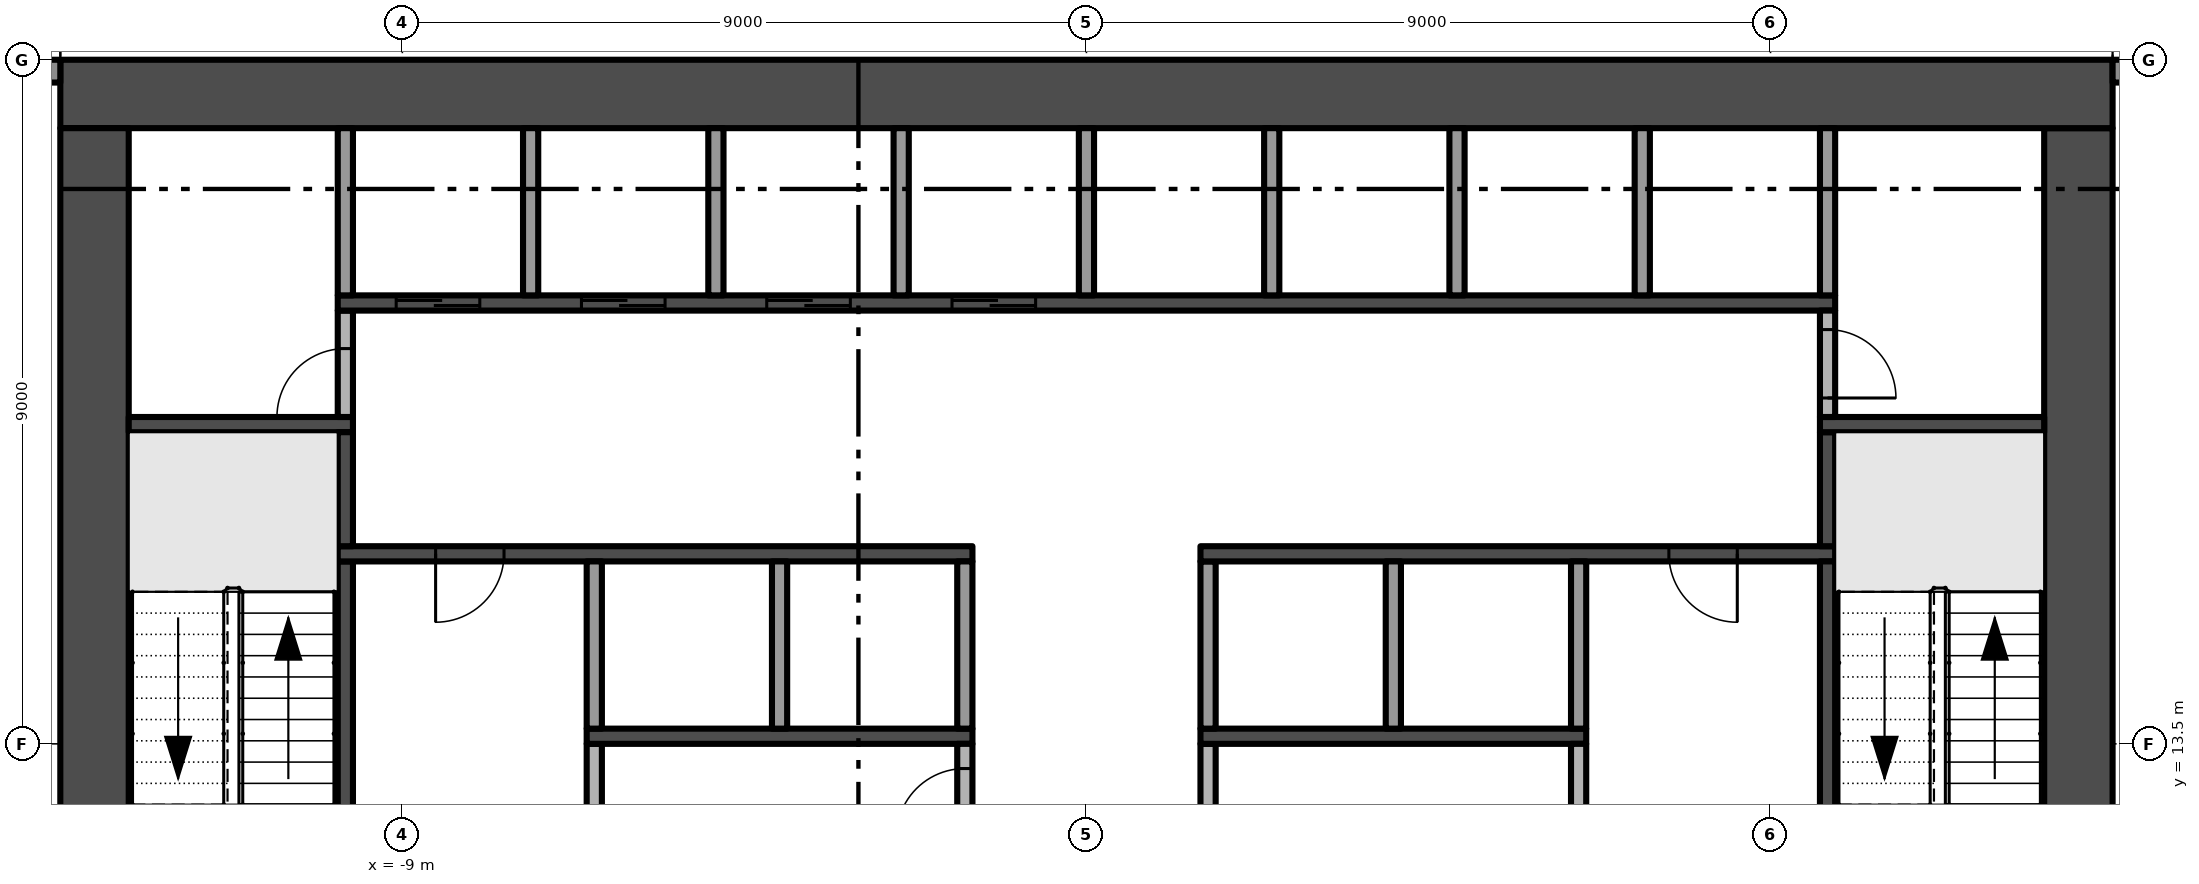
"""IFC4 building model, lengths in metres.
Left out: names, types, materials, properties, quantities, classifications, styles, units other than length and angle.
Written with IfcOpenShell. Run it as: python <this file> out.ifc"""

import sys

from ifc_helpers import new_model, si_unit, direction, frame, frame_2d, origin, place, context, subcontext, project, spatial, rectangle, extrude, element, fill, save


model = new_model("IFC4")
c1 = context("Model", 3, precision=1e-05, world=origin(), true_north=direction((0.0, 1.0)))
c2 = subcontext(c1, "Body", "Model", "MODEL_VIEW")
j1 = project(units=[si_unit("LENGTHUNIT", "METRE"), si_unit("PLANEANGLEUNIT", "RADIAN")], contexts=[c1])
p1 = place(None, origin())
s1 = spatial("IfcSite", under=j1, at=p1, CompositionType="ELEMENT")
p2 = place(p1, origin())
s2 = spatial("IfcBuilding", under=s1, at=p2, CompositionType="ELEMENT")
p3 = place(p2, frame((0.0, 0.0, 49.2)))
s3 = spatial("IfcBuildingStorey", under=s2, at=p3, CompositionType="ELEMENT", Elevation=49.2)
p4 = place(p3, frame((13.05, 5.4, -0.3), z_axis=(0.0, 0.0, 1.0), x_axis=(0.0, 1.0, 0.0)))
e1 = element("IfcWall", 1, at=p4, inside=s3, PredefinedType="SHEAR", context=c2, shape_type="SweptSolid", body=[
    extrude(rectangle(XDim=16.2, YDim=0.9, at=frame_2d((8.1, 0.0))), origin(), (0.0, 0.0, 1.0), 3.8),
])
p5 = place(p4, frame((6.0, 0.0, 0.3)))
e2 = element("IfcOpeningElement", 2, at=p5, cuts=e1, PredefinedType="OPENING", context=c2, shape_type="SweptSolid", body=[
    extrude(rectangle(XDim=1.2, YDim=2.2, at=frame_2d((0.6, 1.1))), frame((0.0, 0.46, 0.0), z_axis=(0.0, -1.0, 0.0), x_axis=(1.0, 0.0, 0.0)), (0.0, 0.0, 1.0), 0.92),
])
p6 = place(p3, frame((13.5, 22.05, -0.3), z_axis=(0.0, 0.0, 1.0), x_axis=(-1.0, 0.0, 0.0)))
e3 = element("IfcWall", 3, at=p6, inside=s3, PredefinedType="SHEAR", context=c2, shape_type="SweptSolid", body=[
    extrude(rectangle(XDim=27.0, YDim=0.9, at=frame_2d((13.5, 0.0))), origin(), (0.0, 0.0, 1.0), 3.8),
])
p7 = place(p3, frame((-13.05, 21.6, -0.3), z_axis=(0.0, 0.0, 1.0), x_axis=(0.0, -1.0, 0.0)))
e4 = element("IfcWall", 4, at=p7, inside=s3, PredefinedType="SHEAR", context=c2, shape_type="SweptSolid", body=[
    extrude(rectangle(XDim=16.2, YDim=0.9, at=frame_2d((8.1, 0.0))), origin(), (0.0, 0.0, 1.0), 3.8),
])
p8 = place(p7, frame((9.0, 0.0, 0.3)))
e5 = element("IfcOpeningElement", 5, at=p8, cuts=e4, PredefinedType="OPENING", context=c2, shape_type="SweptSolid", body=[
    extrude(rectangle(XDim=1.2, YDim=2.2, at=frame_2d((0.6, 1.1))), frame((0.0, 0.46, 0.0), z_axis=(0.0, -1.0, 0.0), x_axis=(1.0, 0.0, 0.0)), (0.0, 0.0, 1.0), 0.92),
])
p9 = place(p3, frame((13.5, 22.35, 0.0), z_axis=(0.0, 0.0, 1.0), x_axis=(1.0, 0.0, 0.0)))
e6 = element("IfcWall", 6, at=p9, inside=s3, PredefinedType="SOLIDWALL", context=c2, shape_type="SweptSolid", body=[
    extrude(rectangle(XDim=3.8, YDim=0.3, at=frame_2d((1.9, 0.0))), origin(), (0.0, 0.0, 1.0), 3.5),
])
p10 = place(p9, frame((0.85, 0.0, 0.45)))
e7 = element("IfcOpeningElement", 7, at=p10, cuts=e6, PredefinedType="OPENING", context=c2, shape_type="SweptSolid", body=[
    extrude(rectangle(XDim=2.65, YDim=2.65, at=frame_2d((1.325, 1.325))), frame((0.0, 0.16, 0.0), z_axis=(0.0, -1.0, 0.0), x_axis=(1.0, 0.0, 0.0)), (0.0, 0.0, 1.0), 0.32),
])
p11 = place(p3, frame((-17.3, 22.35, 0.0), z_axis=(0.0, 0.0, 1.0), x_axis=(1.0, 0.0, 0.0)))
e8 = element("IfcWall", 8, at=p11, inside=s3, PredefinedType="SOLIDWALL", context=c2, shape_type="SweptSolid", body=[
    extrude(rectangle(XDim=3.8, YDim=0.3, at=frame_2d((1.9, 0.0))), origin(), (0.0, 0.0, 1.0), 3.5),
])
p12 = place(p11, frame((0.3, 0.0, 0.0)))
e9 = element("IfcOpeningElement", 9, at=p12, cuts=e8, PredefinedType="OPENING", context=c2, shape_type="SweptSolid", body=[
    extrude(rectangle(XDim=2.65, YDim=2.4, at=frame_2d((1.325, 1.2))), frame((0.0, 0.16, 0.0), z_axis=(0.0, -1.0, 0.0), x_axis=(1.0, 0.0, 0.0)), (0.0, 0.0, 1.0), 0.32),
])
p13 = place(p3, frame((-12.6, 17.7, 0.0), z_axis=(0.0, 0.0, 1.0), x_axis=(1.0, 0.0, 0.0)))
e10 = element("IfcWall", 10, at=p13, inside=s3, PredefinedType="SHEAR", context=c2, shape_type="SweptSolid", body=[
    extrude(rectangle(XDim=2.95, YDim=0.2, at=frame_2d((1.475, 0.0))), origin(), (0.0, 0.0, 1.0), 3.5),
])
p14 = place(p3, frame((-9.75, 10.4, 0.0), z_axis=(0.0, 0.0, 1.0), x_axis=(0.0, 1.0, 0.0)))
e11 = element("IfcWall", 11, at=p14, inside=s3, PredefinedType="SHEAR", context=c2, shape_type="SweptSolid", body=[
    extrude(rectangle(XDim=5.5, YDim=0.2, at=frame_2d((2.75, 0.0))), origin(), (0.0, 0.0, 1.0), 3.5),
])
p15 = place(p3, frame((-1.5, 16.0, 0.0), z_axis=(0.0, 0.0, 1.0), x_axis=(-1.0, 0.0, 0.0)))
e12 = element("IfcWall", 12, at=p15, inside=s3, PredefinedType="SHEAR", context=c2, shape_type="SweptSolid", body=[
    extrude(rectangle(XDim=8.35, YDim=0.2, at=frame_2d((4.175, 0.0))), origin(), (0.0, 0.0, 1.0), 3.5),
])
p16 = place(p15, frame((6.162, 0.0, 0.0)))
e13 = element("IfcOpeningElement", 13, at=p16, cuts=e12, PredefinedType="OPENING", context=c2, shape_type="SweptSolid", body=[
    extrude(rectangle(XDim=0.9, YDim=2.1, at=frame_2d((0.45, 1.05))), frame((0.0, 0.11, 0.0), z_axis=(0.0, -1.0, 0.0), x_axis=(1.0, 0.0, 0.0)), (0.0, 0.0, 1.0), 0.22),
])
p17 = place(p3, frame((-9.75, 16.1, 0.0), z_axis=(0.0, 0.0, 1.0), x_axis=(0.0, 1.0, 0.0)))
e14 = element("IfcWall", 14, at=p17, inside=s3, PredefinedType="SHEAR", context=c2, shape_type="SweptSolid", body=[
    extrude(rectangle(XDim=1.5, YDim=0.2, at=frame_2d((0.75, 0.0))), origin(), (0.0, 0.0, 1.0), 3.5),
])
p18 = place(p3, frame((-9.75, 17.8, 0.0), z_axis=(0.0, 0.0, 1.0), x_axis=(0.0, 1.0, 0.0)))
e15 = element("IfcWall", 15, at=p18, inside=s3, PredefinedType="PARTITIONING", context=c2, shape_type="SweptSolid", body=[
    extrude(rectangle(XDim=1.4, YDim=0.2, at=frame_2d((0.7, 0.0))), origin(), (0.0, 0.0, 1.0), 3.5),
])
p19 = place(p18, origin())
e16 = element("IfcOpeningElement", 16, at=p19, cuts=e15, PredefinedType="OPENING", context=c2, shape_type="SweptSolid", body=[
    extrude(rectangle(XDim=0.9, YDim=2.1, at=frame_2d((0.45, 1.05))), frame((0.0, 0.11, 0.0), z_axis=(0.0, -1.0, 0.0), x_axis=(1.0, 0.0, 0.0)), (0.0, 0.0, 1.0), 0.22),
])
p20 = place(p3, frame((-9.85, 19.3, 0.0), z_axis=(0.0, 0.0, 1.0), x_axis=(1.0, 0.0, 0.0)))
e17 = element("IfcWall", 17, at=p20, inside=s3, PredefinedType="SHEAR", context=c2, shape_type="SweptSolid", body=[
    extrude(rectangle(XDim=19.7, YDim=0.2, at=frame_2d((9.85, 0.0))), origin(), (0.0, 0.0, 1.0), 3.5),
])
p21 = place(p20, frame((0.769, 0.0, 0.0)))
e18 = element("IfcOpeningElement", 18, at=p21, cuts=e17, PredefinedType="OPENING", context=c2, shape_type="SweptSolid", body=[
    extrude(rectangle(XDim=1.1, YDim=2.1, at=frame_2d((0.55, 1.05))), frame((0.0, 0.11, 0.0), z_axis=(0.0, -1.0, 0.0), x_axis=(1.0, 0.0, 0.0)), (0.0, 0.0, 1.0), 0.22),
])
p22 = place(p20, frame((3.206, 0.0, 0.0)))
e19 = element("IfcOpeningElement", 19, at=p22, cuts=e17, PredefinedType="OPENING", context=c2, shape_type="SweptSolid", body=[
    extrude(rectangle(XDim=1.1, YDim=2.1, at=frame_2d((0.55, 1.05))), frame((0.0, 0.11, 0.0), z_axis=(0.0, -1.0, 0.0), x_axis=(1.0, 0.0, 0.0)), (0.0, 0.0, 1.0), 0.22),
])
p23 = place(p20, frame((5.644, 0.0, 0.0)))
e20 = element("IfcOpeningElement", 20, at=p23, cuts=e17, PredefinedType="OPENING", context=c2, shape_type="SweptSolid", body=[
    extrude(rectangle(XDim=1.1, YDim=2.1, at=frame_2d((0.55, 1.05))), frame((0.0, 0.11, 0.0), z_axis=(0.0, -1.0, 0.0), x_axis=(1.0, 0.0, 0.0)), (0.0, 0.0, 1.0), 0.22),
])
p24 = place(p20, frame((8.081, 0.0, 0.0)))
e21 = element("IfcOpeningElement", 21, at=p24, cuts=e17, PredefinedType="OPENING", context=c2, shape_type="SweptSolid", body=[
    extrude(rectangle(XDim=1.1, YDim=2.1, at=frame_2d((0.55, 1.05))), frame((0.0, 0.11, 0.0), z_axis=(0.0, -1.0, 0.0), x_axis=(1.0, 0.0, 0.0)), (0.0, 0.0, 1.0), 0.22),
])
for number, where, z_axis, x_axis in (
    (22, (-9.75, 19.4, 0.0), (0.0, 0.0, 1.0), (0.0, 1.0, 0.0)),
    (23, (-7.312, 19.4, 0.0), (0.0, 0.0, 1.0), (0.0, 1.0, 0.0)),
):
    element("IfcWall", number, at=place(p3, frame(where, z_axis=z_axis, x_axis=x_axis)), inside=s3, PredefinedType="PARTITIONING", context=c2, shape_type="SweptSolid", body=[
        extrude(rectangle(XDim=2.2, YDim=0.2, at=frame_2d((1.1, 0.0))), origin(), (0.0, 0.0, 1.0), 3.5),
    ])
p25 = place(p3, frame((-6.475, 11.95, 0.0), z_axis=(0.0, 0.0, 1.0), x_axis=(0.0, 1.0, 0.0)))
e24 = element("IfcWall", 24, at=p25, inside=s3, PredefinedType="PARTITIONING", context=c2, shape_type="SweptSolid", body=[
    extrude(rectangle(XDim=1.55, YDim=0.2, at=frame_2d((0.775, 0.0))), origin(), (0.0, 0.0, 1.0), 3.5),
])
p26 = place(p3, frame((-6.575, 13.6, 0.0), z_axis=(0.0, 0.0, 1.0), x_axis=(1.0, 0.0, 0.0)))
e25 = element("IfcWall", 25, at=p26, inside=s3, PredefinedType="SHEAR", context=c2, shape_type="SweptSolid", body=[
    extrude(rectangle(XDim=5.075, YDim=0.2, at=frame_2d((2.538, 0.0))), origin(), (0.0, 0.0, 1.0), 3.5),
])
for number, where, z_axis, x_axis in (
    (26, (-6.475, 13.7, 0.0), (0.0, 0.0, 1.0), (0.0, 1.0, 0.0)),
    (27, (-4.875, 19.4, 0.0), (0.0, 0.0, 1.0), (0.0, 1.0, 0.0)),
    (28, (-4.037, 13.7, 0.0), (0.0, 0.0, 1.0), (0.0, 1.0, 0.0)),
    (29, (-2.438, 19.4, 0.0), (0.0, 0.0, 1.0), (0.0, 1.0, 0.0)),
):
    element("IfcWall", number, at=place(p3, frame(where, z_axis=z_axis, x_axis=x_axis)), inside=s3, PredefinedType="PARTITIONING", context=c2, shape_type="SweptSolid", body=[
        extrude(rectangle(XDim=2.2, YDim=0.2, at=frame_2d((1.1, 0.0))), origin(), (0.0, 0.0, 1.0), 3.5),
    ])
p27 = place(p3, frame((-1.6, 11.95, 0.0), z_axis=(0.0, 0.0, 1.0), x_axis=(0.0, 1.0, 0.0)))
e30 = element("IfcWall", 30, at=p27, inside=s3, PredefinedType="PARTITIONING", context=c2, shape_type="SweptSolid", body=[
    extrude(rectangle(XDim=1.55, YDim=0.2, at=frame_2d((0.775, 0.0))), origin(), (0.0, 0.0, 1.0), 3.5),
])
p28 = place(p27, frame((0.325, 0.0, 0.0)))
e31 = element("IfcOpeningElement", 31, at=p28, cuts=e30, PredefinedType="OPENING", context=c2, shape_type="SweptSolid", body=[
    extrude(rectangle(XDim=0.9, YDim=2.1, at=frame_2d((0.45, 1.05))), frame((0.0, 0.11, 0.0), z_axis=(0.0, -1.0, 0.0), x_axis=(1.0, 0.0, 0.0)), (0.0, 0.0, 1.0), 0.22),
])
for number, where, z_axis, x_axis in (
    (32, (-1.6, 13.7, 0.0), (0.0, 0.0, 1.0), (0.0, 1.0, 0.0)),
    (33, (0.0, 19.4, 0.0), (0.0, 0.0, 1.0), (0.0, 1.0, 0.0)),
):
    element("IfcWall", number, at=place(p3, frame(where, z_axis=z_axis, x_axis=x_axis)), inside=s3, PredefinedType="PARTITIONING", context=c2, shape_type="SweptSolid", body=[
        extrude(rectangle(XDim=2.2, YDim=0.2, at=frame_2d((1.1, 0.0))), origin(), (0.0, 0.0, 1.0), 3.5),
    ])
p29 = place(p3, frame((1.6, 13.5, 0.0), z_axis=(0.0, 0.0, 1.0), x_axis=(0.0, -1.0, 0.0)))
e34 = element("IfcWall", 34, at=p29, inside=s3, PredefinedType="PARTITIONING", context=c2, shape_type="SweptSolid", body=[
    extrude(rectangle(XDim=2.9, YDim=0.2, at=frame_2d((1.45, 0.0))), origin(), (0.0, 0.0, 1.0), 3.5),
])
p30 = place(p29, frame((1.0, 0.0, 0.0)))
e35 = element("IfcOpeningElement", 35, at=p30, cuts=e34, PredefinedType="OPENING", context=c2, shape_type="SweptSolid", body=[
    extrude(rectangle(XDim=0.9, YDim=2.1, at=frame_2d((0.45, 1.05))), frame((0.0, 0.11, 0.0), z_axis=(0.0, -1.0, 0.0), x_axis=(1.0, 0.0, 0.0)), (0.0, 0.0, 1.0), 0.22),
])
p31 = place(p3, frame((1.5, 13.6, 0.0), z_axis=(0.0, 0.0, 1.0), x_axis=(1.0, 0.0, 0.0)))
e36 = element("IfcWall", 36, at=p31, inside=s3, PredefinedType="SHEAR", context=c2, shape_type="SweptSolid", body=[
    extrude(rectangle(XDim=5.075, YDim=0.2, at=frame_2d((2.538, 0.0))), origin(), (0.0, 0.0, 1.0), 3.5),
])
p32 = place(p3, frame((1.6, 13.7, 0.0), z_axis=(0.0, 0.0, 1.0), x_axis=(0.0, 1.0, 0.0)))
e37 = element("IfcWall", 37, at=p32, inside=s3, PredefinedType="PARTITIONING", context=c2, shape_type="SweptSolid", body=[
    extrude(rectangle(XDim=2.2, YDim=0.2, at=frame_2d((1.1, 0.0))), origin(), (0.0, 0.0, 1.0), 3.5),
])
p33 = place(p3, frame((9.85, 16.0, 0.0), z_axis=(0.0, 0.0, 1.0), x_axis=(-1.0, 0.0, 0.0)))
e38 = element("IfcWall", 38, at=p33, inside=s3, PredefinedType="SHEAR", context=c2, shape_type="SweptSolid", body=[
    extrude(rectangle(XDim=8.35, YDim=0.2, at=frame_2d((4.175, 0.0))), origin(), (0.0, 0.0, 1.0), 3.5),
])
p34 = place(p33, frame((1.288, 0.0, 0.0)))
e39 = element("IfcOpeningElement", 39, at=p34, cuts=e38, PredefinedType="OPENING", context=c2, shape_type="SweptSolid", body=[
    extrude(rectangle(XDim=0.9, YDim=2.1, at=frame_2d((0.45, 1.05))), frame((0.0, 0.11, 0.0), z_axis=(0.0, -1.0, 0.0), x_axis=(1.0, 0.0, 0.0)), (0.0, 0.0, 1.0), 0.22),
])
for number, where, z_axis, x_axis in (
    (40, (2.438, 19.4, 0.0), (0.0, 0.0, 1.0), (0.0, 1.0, 0.0)),
    (41, (4.037, 13.7, 0.0), (0.0, 0.0, 1.0), (0.0, 1.0, 0.0)),
    (42, (4.875, 19.4, 0.0), (0.0, 0.0, 1.0), (0.0, 1.0, 0.0)),
):
    element("IfcWall", number, at=place(p3, frame(where, z_axis=z_axis, x_axis=x_axis)), inside=s3, PredefinedType="PARTITIONING", context=c2, shape_type="SweptSolid", body=[
        extrude(rectangle(XDim=2.2, YDim=0.2, at=frame_2d((1.1, 0.0))), origin(), (0.0, 0.0, 1.0), 3.5),
    ])
p35 = place(p3, frame((6.475, 12.3, 0.0), z_axis=(0.0, 0.0, 1.0), x_axis=(0.0, 1.0, 0.0)))
e43 = element("IfcWall", 43, at=p35, inside=s3, PredefinedType="PARTITIONING", context=c2, shape_type="SweptSolid", body=[
    extrude(rectangle(XDim=1.2, YDim=0.2, at=frame_2d((0.6, 0.0))), origin(), (0.0, 0.0, 1.0), 3.5),
])
for number, where, z_axis, x_axis in (
    (44, (6.475, 13.7, 0.0), (0.0, 0.0, 1.0), (0.0, 1.0, 0.0)),
    (45, (7.312, 19.4, 0.0), (0.0, 0.0, 1.0), (0.0, 1.0, 0.0)),
):
    element("IfcWall", number, at=place(p3, frame(where, z_axis=z_axis, x_axis=x_axis)), inside=s3, PredefinedType="PARTITIONING", context=c2, shape_type="SweptSolid", body=[
        extrude(rectangle(XDim=2.2, YDim=0.2, at=frame_2d((1.1, 0.0))), origin(), (0.0, 0.0, 1.0), 3.5),
    ])
p36 = place(p3, frame((9.75, 12.3, 0.0), z_axis=(0.0, 0.0, 1.0), x_axis=(0.0, 1.0, 0.0)))
e46 = element("IfcWall", 46, at=p36, inside=s3, PredefinedType="SHEAR", context=c2, shape_type="SweptSolid", body=[
    extrude(rectangle(XDim=3.6, YDim=0.2, at=frame_2d((1.8, 0.0))), origin(), (0.0, 0.0, 1.0), 3.5),
])
p37 = place(p3, frame((9.75, 16.1, 0.0), z_axis=(0.0, 0.0, 1.0), x_axis=(0.0, 1.0, 0.0)))
e47 = element("IfcWall", 47, at=p37, inside=s3, PredefinedType="SHEAR", context=c2, shape_type="SweptSolid", body=[
    extrude(rectangle(XDim=1.5, YDim=0.2, at=frame_2d((0.75, 0.0))), origin(), (0.0, 0.0, 1.0), 3.5),
])
p38 = place(p3, frame((9.65, 17.7, 0.0), z_axis=(0.0, 0.0, 1.0), x_axis=(1.0, 0.0, 0.0)))
e48 = element("IfcWall", 48, at=p38, inside=s3, PredefinedType="SHEAR", context=c2, shape_type="SweptSolid", body=[
    extrude(rectangle(XDim=2.95, YDim=0.2, at=frame_2d((1.475, 0.0))), origin(), (0.0, 0.0, 1.0), 3.5),
])
p39 = place(p3, frame((9.75, 19.2, 0.0), z_axis=(0.0, 0.0, 1.0), x_axis=(0.0, -1.0, 0.0)))
e49 = element("IfcWall", 49, at=p39, inside=s3, PredefinedType="PARTITIONING", context=c2, shape_type="SweptSolid", body=[
    extrude(rectangle(XDim=1.4, YDim=0.2, at=frame_2d((0.7, 0.0))), origin(), (0.0, 0.0, 1.0), 3.5),
])
p40 = place(p39, frame((0.25, 0.0, 0.0)))
e50 = element("IfcOpeningElement", 50, at=p40, cuts=e49, PredefinedType="OPENING", context=c2, shape_type="SweptSolid", body=[
    extrude(rectangle(XDim=0.9, YDim=2.1, at=frame_2d((0.45, 1.05))), frame((0.0, 0.11, 0.0), z_axis=(0.0, -1.0, 0.0), x_axis=(1.0, 0.0, 0.0)), (0.0, 0.0, 1.0), 0.22),
])
p41 = place(p3, frame((9.75, 19.4, 0.0), z_axis=(0.0, 0.0, 1.0), x_axis=(0.0, 1.0, 0.0)))
e51 = element("IfcWall", 51, at=p41, inside=s3, PredefinedType="PARTITIONING", context=c2, shape_type="SweptSolid", body=[
    extrude(rectangle(XDim=2.2, YDim=0.2, at=frame_2d((1.1, 0.0))), origin(), (0.0, 0.0, 1.0), 3.5),
])
p42 = place(p21, origin())
e52 = element("IfcDoor", 52, at=p42, inside=s3, OperationType="SLIDING_TO_LEFT", PredefinedType="DOOR", context=c2, shape_type="SweptSolid", body=[
    extrude(rectangle(XDim=1.1, YDim=2.1, at=frame_2d((0.55, 1.05))), frame((0.0, 0.025, 0.0), z_axis=(0.0, -1.0, 0.0), x_axis=(1.0, 0.0, 0.0)), (0.0, 0.0, 1.0), 0.05),
])
fill(e18, e52)
p43 = place(p22, origin())
e53 = element("IfcDoor", 53, at=p43, inside=s3, OperationType="SLIDING_TO_LEFT", PredefinedType="DOOR", context=c2, shape_type="SweptSolid", body=[
    extrude(rectangle(XDim=1.1, YDim=2.1, at=frame_2d((0.55, 1.05))), frame((0.0, 0.025, 0.0), z_axis=(0.0, -1.0, 0.0), x_axis=(1.0, 0.0, 0.0)), (0.0, 0.0, 1.0), 0.05),
])
fill(e19, e53)
p44 = place(p23, origin())
e54 = element("IfcDoor", 54, at=p44, inside=s3, OperationType="SLIDING_TO_LEFT", PredefinedType="DOOR", context=c2, shape_type="SweptSolid", body=[
    extrude(rectangle(XDim=1.1, YDim=2.1, at=frame_2d((0.55, 1.05))), frame((0.0, 0.025, 0.0), z_axis=(0.0, -1.0, 0.0), x_axis=(1.0, 0.0, 0.0)), (0.0, 0.0, 1.0), 0.05),
])
fill(e20, e54)
p45 = place(p24, origin())
e55 = element("IfcDoor", 55, at=p45, inside=s3, OperationType="SLIDING_TO_LEFT", PredefinedType="DOOR", context=c2, shape_type="SweptSolid", body=[
    extrude(rectangle(XDim=1.1, YDim=2.1, at=frame_2d((0.55, 1.05))), frame((0.0, 0.025, 0.0), z_axis=(0.0, -1.0, 0.0), x_axis=(1.0, 0.0, 0.0)), (0.0, 0.0, 1.0), 0.05),
])
fill(e21, e55)
p46 = place(p16, origin())
e56 = element("IfcDoor", 56, at=p46, inside=s3, OperationType="SINGLE_SWING_RIGHT", PredefinedType="DOOR", context=c2, shape_type="SweptSolid", body=[
    extrude(rectangle(XDim=0.9, YDim=2.1, at=frame_2d((0.45, 1.05))), frame((0.0, 0.025, 0.0), z_axis=(0.0, -1.0, 0.0), x_axis=(1.0, 0.0, 0.0)), (0.0, 0.0, 1.0), 0.05),
])
fill(e13, e56)
p47 = place(p28, origin())
e57 = element("IfcDoor", 57, at=p47, inside=s3, OperationType="SINGLE_SWING_LEFT", PredefinedType="DOOR", context=c2, shape_type="SweptSolid", body=[
    extrude(rectangle(XDim=0.9, YDim=2.1, at=frame_2d((0.45, 1.05))), frame((0.0, 0.025, 0.0), z_axis=(0.0, -1.0, 0.0), x_axis=(1.0, 0.0, 0.0)), (0.0, 0.0, 1.0), 0.05),
])
fill(e31, e57)
p48 = place(p34, origin())
e58 = element("IfcDoor", 58, at=p48, inside=s3, OperationType="SINGLE_SWING_LEFT", PredefinedType="DOOR", context=c2, shape_type="SweptSolid", body=[
    extrude(rectangle(XDim=0.9, YDim=2.1, at=frame_2d((0.45, 1.05))), frame((0.0, 0.025, 0.0), z_axis=(0.0, -1.0, 0.0), x_axis=(1.0, 0.0, 0.0)), (0.0, 0.0, 1.0), 0.05),
])
fill(e39, e58)
p49 = place(p19, origin())
e59 = element("IfcDoor", 59, at=p49, inside=s3, OperationType="SINGLE_SWING_LEFT", PredefinedType="DOOR", context=c2, shape_type="SweptSolid", body=[
    extrude(rectangle(XDim=0.9, YDim=2.1, at=frame_2d((0.45, 1.05))), frame((0.0, 0.025, 0.0), z_axis=(0.0, -1.0, 0.0), x_axis=(1.0, 0.0, 0.0)), (0.0, 0.0, 1.0), 0.05),
])
fill(e16, e59)
p50 = place(p40, origin())
e60 = element("IfcDoor", 60, at=p50, inside=s3, OperationType="SINGLE_SWING_RIGHT", PredefinedType="DOOR", context=c2, shape_type="SweptSolid", body=[
    extrude(rectangle(XDim=0.9, YDim=2.1, at=frame_2d((0.45, 1.05))), frame((0.0, 0.025, 0.0), z_axis=(0.0, -1.0, 0.0), x_axis=(1.0, 0.0, 0.0)), (0.0, 0.0, 1.0), 0.05),
])
fill(e50, e60)
save(model, sys.argv[1])
